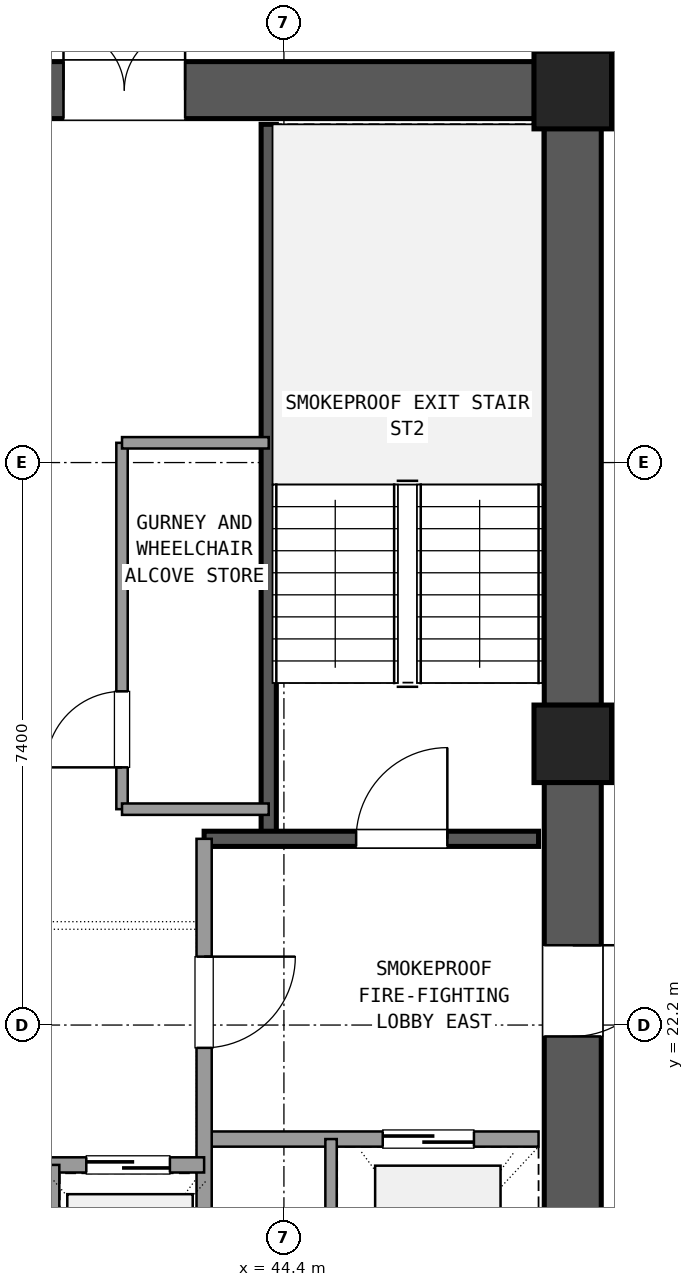
"""IFC4 building model, lengths in metres.
Left out: names, types, materials, properties, quantities, classifications, styles, units other than length and angle.
Written with IfcOpenShell. Run it as: python <this file> out.ifc"""

import sys

from ifc_helpers import new_model, si_unit, direction, frame, frame_2d, origin, origin_2d, place, context, subcontext, project, spatial, rectangle, extrude, element, fill, save


model = new_model("IFC4")
c1 = context("Model", 3, precision=1e-05, world=origin(), true_north=direction((0.0, 1.0)))
c2 = subcontext(c1, "Body", "Model", "MODEL_VIEW")
j1 = project(units=[si_unit("LENGTHUNIT", "METRE"), si_unit("PLANEANGLEUNIT", "RADIAN")], contexts=[c1])
p1 = place(None, origin())
s1 = spatial("IfcSite", under=j1, at=p1, CompositionType="ELEMENT")
p2 = place(p1, origin())
s2 = spatial("IfcBuilding", under=s1, at=p2, CompositionType="ELEMENT")
p3 = place(p2, frame((0.0, 0.0, 170.82)))
s3 = spatial("IfcBuildingStorey", under=s2, at=p3, CompositionType="ELEMENT", Elevation=170.82)
for number, where, z_axis, x_axis in (
    (1, (48.2, 25.9, 0.0), (0.0, 0.0, 1.0), (1.0, 0.0, 0.0)),
    (2, (48.2, 34.5, 0.0), (0.0, 0.0, 1.0), (1.0, 0.0, 0.0)),
):
    element("IfcColumn", number, at=place(p3, frame(where, z_axis=z_axis, x_axis=x_axis)), inside=s3, PredefinedType="COLUMN", context=c2, shape_type="SweptSolid", body=[
        extrude(rectangle(XDim=1.02, YDim=1.02, at=origin_2d()), origin(), (0.0, 0.0, 1.0), 3.6),
    ])
p4 = place(p3, frame((48.2, 17.805, 0.0), z_axis=(0.0, 0.0, 1.0), x_axis=(0.0, 1.0, 0.0)))
e3 = element("IfcWall", 3, at=p4, inside=s3, PredefinedType="SHEAR", context=c2, shape_type="SweptSolid", body=[
    extrude(rectangle(XDim=7.59, YDim=0.75, at=frame_2d((3.795, 0.0))), origin(), (0.0, 0.0, 1.0), 3.32),
])
p5 = place(p4, frame((4.245, 0.0, 0.0)))
e4 = element("IfcOpeningElement", 4, at=p5, cuts=e3, PredefinedType="OPENING", context=c2, shape_type="SweptSolid", body=[
    extrude(rectangle(XDim=1.2, YDim=2.15, at=frame_2d((0.6, 1.075))), frame((0.0, 0.385, 0.0), z_axis=(0.0, -1.0, 0.0), x_axis=(1.0, 0.0, 0.0)), (0.0, 0.0, 1.0), 0.77),
])
p6 = place(p3, frame((48.2, 26.405, 0.0), z_axis=(0.0, 0.0, 1.0), x_axis=(0.0, 1.0, 0.0)))
e5 = element("IfcWall", 5, at=p6, inside=s3, PredefinedType="SHEAR", context=c2, shape_type="SweptSolid", body=[
    extrude(rectangle(XDim=7.59, YDim=0.75, at=frame_2d((3.795, 0.0))), origin(), (0.0, 0.0, 1.0), 3.32),
])
p7 = place(p3, frame((47.695, 34.5, 0.0), z_axis=(0.0, 0.0, 1.0), x_axis=(-1.0, 0.0, 0.0)))
e6 = element("IfcWall", 6, at=p7, inside=s3, PredefinedType="SHEAR", context=c2, shape_type="SweptSolid", body=[
    extrude(rectangle(XDim=10.19, YDim=0.75, at=frame_2d((5.095, 0.0))), origin(), (0.0, 0.0, 1.0), 3.32),
])
p8 = place(p7, frame((4.595, 0.0, 0.0)))
e7 = element("IfcOpeningElement", 7, at=p8, cuts=e6, PredefinedType="OPENING", context=c2, shape_type="SweptSolid", body=[
    extrude(rectangle(XDim=1.6, YDim=2.2, at=frame_2d((0.8, 1.1))), frame((0.0, 0.385, 0.0), z_axis=(0.0, -1.0, 0.0), x_axis=(1.0, 0.0, 0.0)), (0.0, 0.0, 1.0), 0.77),
])
p9 = place(p3, frame((44.2, 24.65, 0.0), z_axis=(0.0, 0.0, 1.0), x_axis=(0.0, 1.0, 0.0)))
e8 = element("IfcWall", 8, at=p9, inside=s3, PredefinedType="SHEAR", context=c2, shape_type="SweptSolid", body=[
    extrude(rectangle(XDim=9.4, YDim=0.2, at=frame_2d((4.7, 0.0))), origin(), (0.0, 0.0, 1.0), 3.32),
])
p10 = place(p3, frame((43.35, 24.65, 0.0), z_axis=(0.0, 0.0, 1.0), x_axis=(1.0, 0.0, 0.0)))
e9 = element("IfcWall", 9, at=p10, inside=s3, PredefinedType="SHEAR", context=c2, shape_type="SweptSolid", body=[
    extrude(rectangle(XDim=4.4, YDim=0.2, at=frame_2d((2.2, 0.0))), origin(), (0.0, 0.0, 1.0), 3.32),
])
p11 = place(p10, frame((2.0, 0.0, 0.0)))
e10 = element("IfcOpeningElement", 10, at=p11, cuts=e9, PredefinedType="OPENING", context=c2, shape_type="SweptSolid", body=[
    extrude(rectangle(XDim=1.2, YDim=2.15, at=frame_2d((0.6, 1.075))), frame((0.0, 0.11, 0.0), z_axis=(0.0, -1.0, 0.0), x_axis=(1.0, 0.0, 0.0)), (0.0, 0.0, 1.0), 0.22),
])
p12 = place(p3, frame((43.35, 20.7, 0.0), z_axis=(0.0, 0.0, 1.0), x_axis=(1.0, 0.0, 0.0)))
e11 = element("IfcWall", 11, at=p12, inside=s3, PredefinedType="SOLIDWALL", context=c2, shape_type="SweptSolid", body=[
    extrude(rectangle(XDim=4.4, YDim=0.2, at=frame_2d((2.2, 0.0))), origin(), (0.0, 0.0, 1.0), 2.61),
])
p13 = place(p12, frame((2.35, 0.0, 0.0)))
e12 = element("IfcOpeningElement", 12, at=p13, cuts=e11, PredefinedType="OPENING", context=c2, shape_type="SweptSolid", body=[
    extrude(rectangle(XDim=1.2, YDim=2.15, at=frame_2d((0.6, 1.075))), frame((0.0, 0.11, 0.0), z_axis=(0.0, -1.0, 0.0), x_axis=(1.0, 0.0, 0.0)), (0.0, 0.0, 1.0), 0.22),
])
p14 = place(p3, frame((43.35, 17.75, 0.0), z_axis=(0.0, 0.0, 1.0), x_axis=(0.0, 1.0, 0.0)))
e13 = element("IfcWall", 13, at=p14, inside=s3, PredefinedType="SOLIDWALL", context=c2, shape_type="SweptSolid", body=[
    extrude(rectangle(XDim=6.9, YDim=0.2, at=frame_2d((3.45, 0.0))), origin(), (0.0, 0.0, 1.0), 2.61),
])
p15 = place(p14, frame((4.15, 0.0, 0.0)))
e14 = element("IfcOpeningElement", 14, at=p15, cuts=e13, PredefinedType="OPENING", context=c2, shape_type="SweptSolid", body=[
    extrude(rectangle(XDim=1.2, YDim=2.15, at=frame_2d((0.6, 1.075))), frame((0.0, 0.11, 0.0), z_axis=(0.0, -1.0, 0.0), x_axis=(1.0, 0.0, 0.0)), (0.0, 0.0, 1.0), 0.22),
])
p16 = place(p3, frame((45.02, 17.75, 0.0), z_axis=(0.0, 0.0, 1.0), x_axis=(0.0, 1.0, 0.0)))
e15 = element("IfcWall", 15, at=p16, inside=s3, PredefinedType="PARTITIONING", context=c2, shape_type="SweptSolid", body=[
    extrude(rectangle(XDim=2.95, YDim=0.15, at=frame_2d((1.475, 0.0))), origin(), (0.0, 0.0, 1.0), 2.61),
])
p17 = place(p3, frame((37.25, 20.36, 0.0), z_axis=(0.0, 0.0, 1.0), x_axis=(1.0, 0.0, 0.0)))
e16 = element("IfcWall", 16, at=p17, inside=s3, PredefinedType="SOLIDWALL", context=c2, shape_type="SweptSolid", body=[
    extrude(rectangle(XDim=6.1, YDim=0.2, at=frame_2d((3.05, 0.0))), origin(), (0.0, 0.0, 1.0), 2.61),
])
p18 = place(p17, frame((0.45, 0.0, 0.0)))
e17 = element("IfcOpeningElement", 17, at=p18, cuts=e16, PredefinedType="OPENING", context=c2, shape_type="SweptSolid", body=[
    extrude(rectangle(XDim=1.1, YDim=2.15, at=frame_2d((0.55, 1.075))), frame((0.0, 0.11, 0.0), z_axis=(0.0, -1.0, 0.0), x_axis=(1.0, 0.0, 0.0)), (0.0, 0.0, 1.0), 0.22),
])
p19 = place(p17, frame((2.5, 0.0, 0.0)))
e18 = element("IfcOpeningElement", 18, at=p19, cuts=e16, PredefinedType="OPENING", context=c2, shape_type="SweptSolid", body=[
    extrude(rectangle(XDim=1.1, YDim=2.15, at=frame_2d((0.55, 1.075))), frame((0.0, 0.11, 0.0), z_axis=(0.0, -1.0, 0.0), x_axis=(1.0, 0.0, 0.0)), (0.0, 0.0, 1.0), 0.22),
])
p20 = place(p17, frame((4.55, 0.0, 0.0)))
e19 = element("IfcOpeningElement", 19, at=p20, cuts=e16, PredefinedType="OPENING", context=c2, shape_type="SweptSolid", body=[
    extrude(rectangle(XDim=1.1, YDim=2.15, at=frame_2d((0.55, 1.075))), frame((0.0, 0.11, 0.0), z_axis=(0.0, -1.0, 0.0), x_axis=(1.0, 0.0, 0.0)), (0.0, 0.0, 1.0), 0.22),
])
p21 = place(p3, frame((41.37, 17.75, 0.0), z_axis=(0.0, 0.0, 1.0), x_axis=(0.0, 1.0, 0.0)))
e20 = element("IfcWall", 20, at=p21, inside=s3, PredefinedType="PARTITIONING", context=c2, shape_type="SweptSolid", body=[
    extrude(rectangle(XDim=2.61, YDim=0.15, at=frame_2d((1.305, 0.0))), origin(), (0.0, 0.0, 1.0), 2.61),
])
p22 = place(p3, frame((42.27, 25.04, 0.0), z_axis=(0.0, 0.0, 1.0), x_axis=(0.0, 1.0, 0.0)))
e21 = element("IfcWall", 21, at=p22, inside=s3, PredefinedType="PARTITIONING", context=c2, shape_type="SweptSolid", body=[
    extrude(rectangle(XDim=4.82, YDim=0.15, at=frame_2d((2.41, 0.0))), origin(), (0.0, 0.0, 1.0), 2.61),
])
p23 = place(p22, frame((0.55, 0.0, 0.0)))
e22 = element("IfcOpeningElement", 22, at=p23, cuts=e21, PredefinedType="OPENING", context=c2, shape_type="SweptSolid", body=[
    extrude(rectangle(XDim=1.0, YDim=2.15, at=frame_2d((0.5, 1.075))), frame((0.0, 0.085, 0.0), z_axis=(0.0, -1.0, 0.0), x_axis=(1.0, 0.0, 0.0)), (0.0, 0.0, 1.0), 0.17),
])
for number, where, z_axis, x_axis in (
    (23, (42.27, 25.04, 0.0), (0.0, 0.0, 1.0), (1.0, 0.0, 0.0)),
    (24, (42.27, 29.86, 0.0), (0.0, 0.0, 1.0), (1.0, 0.0, 0.0)),
):
    element("IfcWall", number, at=place(p3, frame(where, z_axis=z_axis, x_axis=x_axis)), inside=s3, PredefinedType="PARTITIONING", context=c2, shape_type="SweptSolid", body=[
        extrude(rectangle(XDim=1.93, YDim=0.15, at=frame_2d((0.965, 0.0))), origin(), (0.0, 0.0, 1.0), 2.61),
    ])
p24 = place(p11, origin())
e25 = element("IfcDoor", 25, at=p24, inside=s3, OperationType="SINGLE_SWING_RIGHT", PredefinedType="DOOR", context=c2, shape_type="SweptSolid", body=[
    extrude(rectangle(XDim=1.2, YDim=2.15, at=frame_2d((0.6, 1.075))), frame((0.0, 0.025, 0.0), z_axis=(0.0, -1.0, 0.0), x_axis=(1.0, 0.0, 0.0)), (0.0, 0.0, 1.0), 0.05),
])
fill(e10, e25)
p25 = place(p13, origin())
e26 = element("IfcDoor", 26, at=p25, inside=s3, OperationType="SLIDING_TO_RIGHT", PredefinedType="DOOR", context=c2, shape_type="SweptSolid", body=[
    extrude(rectangle(XDim=1.2, YDim=2.15, at=frame_2d((0.6, 1.075))), frame((0.0, 0.025, 0.0), z_axis=(0.0, -1.0, 0.0), x_axis=(1.0, 0.0, 0.0)), (0.0, 0.0, 1.0), 0.05),
])
fill(e12, e26)
p26 = place(p15, frame((1.2, 0.0, 0.0), z_axis=(0.0, 0.0, 1.0), x_axis=(-1.0, 0.0, 0.0)))
e27 = element("IfcDoor", 27, at=p26, inside=s3, OperationType="SINGLE_SWING_RIGHT", PredefinedType="DOOR", context=c2, shape_type="SweptSolid", body=[
    extrude(rectangle(XDim=1.2, YDim=2.15, at=frame_2d((0.6, 1.075))), frame((0.0, 0.025, 0.0), z_axis=(0.0, -1.0, 0.0), x_axis=(1.0, 0.0, 0.0)), (0.0, 0.0, 1.0), 0.05),
])
fill(e14, e27)
p27 = place(p5, frame((1.2, 0.0, 0.0), z_axis=(0.0, 0.0, 1.0), x_axis=(-1.0, 0.0, 0.0)))
e28 = element("IfcDoor", 28, at=p27, inside=s3, OperationType="SINGLE_SWING_RIGHT", PredefinedType="DOOR", context=c2, shape_type="SweptSolid", body=[
    extrude(rectangle(XDim=1.2, YDim=2.15, at=frame_2d((0.6, 1.075))), frame((0.0, 0.025, 0.0), z_axis=(0.0, -1.0, 0.0), x_axis=(1.0, 0.0, 0.0)), (0.0, 0.0, 1.0), 0.05),
])
fill(e4, e28)
p28 = place(p8, frame((1.6, 0.0, 0.0), z_axis=(0.0, 0.0, 1.0), x_axis=(-1.0, 0.0, 0.0)))
e29 = element("IfcDoor", 29, at=p28, inside=s3, OperationType="DOUBLE_DOOR_SINGLE_SWING", PredefinedType="DOOR", context=c2, shape_type="SweptSolid", body=[
    extrude(rectangle(XDim=1.6, YDim=2.2, at=frame_2d((0.8, 1.1))), frame((0.0, 0.025, 0.0), z_axis=(0.0, -1.0, 0.0), x_axis=(1.0, 0.0, 0.0)), (0.0, 0.0, 1.0), 0.05),
])
fill(e7, e29)
p29 = place(p20, origin())
e30 = element("IfcDoor", 30, at=p29, inside=s3, OperationType="SLIDING_TO_LEFT", PredefinedType="DOOR", context=c2, shape_type="SweptSolid", body=[
    extrude(rectangle(XDim=1.1, YDim=2.15, at=frame_2d((0.55, 1.075))), frame((0.0, 0.025, 0.0), z_axis=(0.0, -1.0, 0.0), x_axis=(1.0, 0.0, 0.0)), (0.0, 0.0, 1.0), 0.05),
])
fill(e19, e30)
p30 = place(p23, origin())
e31 = element("IfcDoor", 31, at=p30, inside=s3, OperationType="SINGLE_SWING_LEFT", PredefinedType="DOOR", context=c2, shape_type="SweptSolid", body=[
    extrude(rectangle(XDim=1.0, YDim=2.15, at=frame_2d((0.5, 1.075))), frame((0.0, 0.025, 0.0), z_axis=(0.0, -1.0, 0.0), x_axis=(1.0, 0.0, 0.0)), (0.0, 0.0, 1.0), 0.05),
])
fill(e22, e31)
save(model, sys.argv[1])
